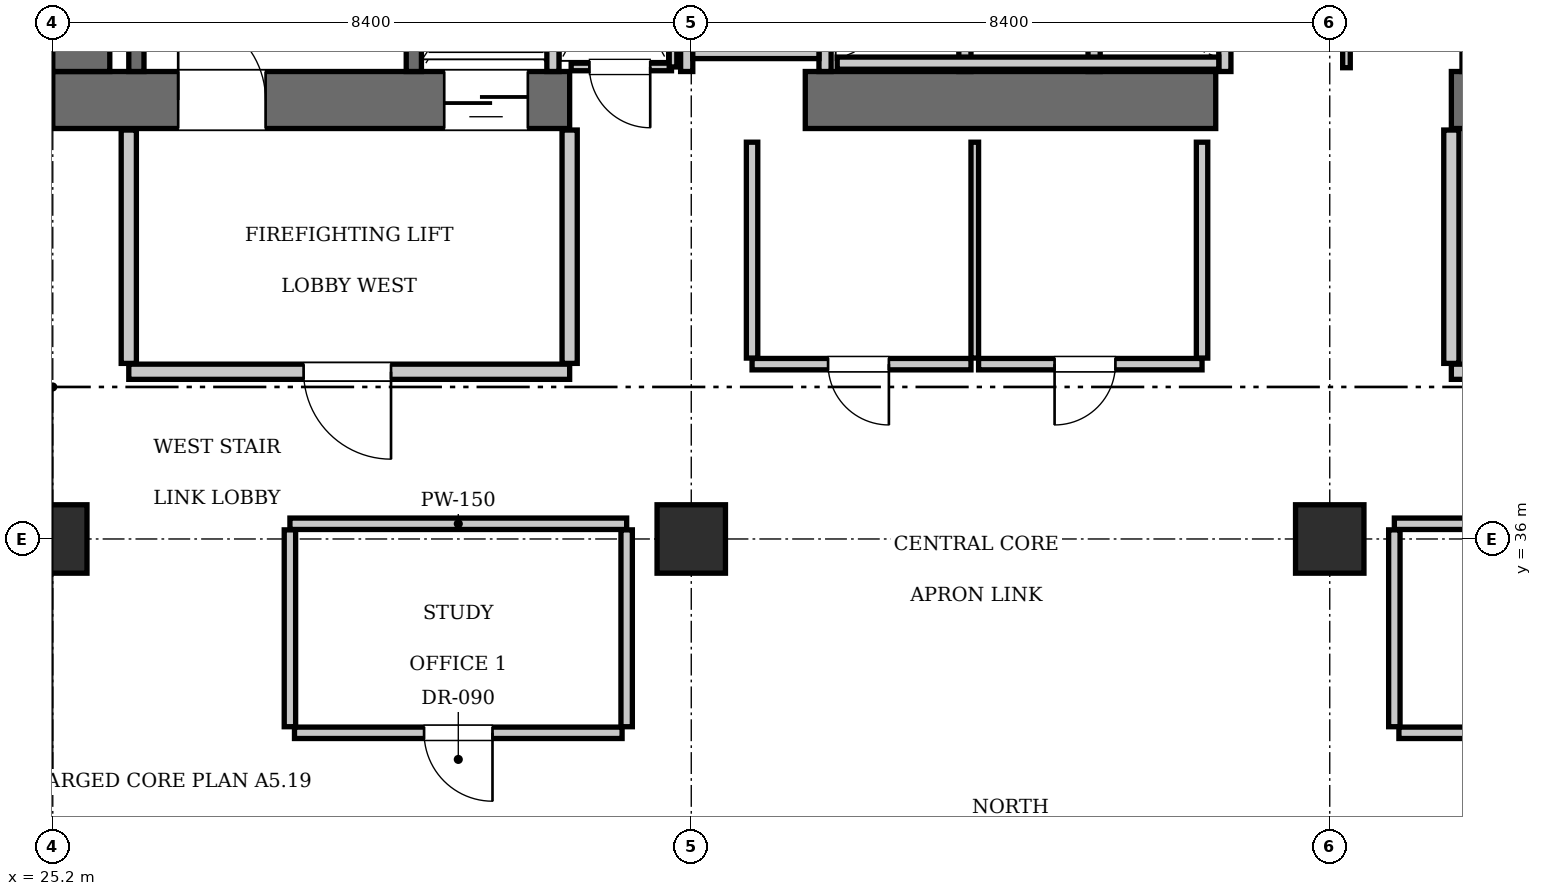
"""IFC4 building model, lengths in metres.
Left out: names, types, materials, properties, quantities, classifications, styles, units other than length and angle.
Written with IfcOpenShell. Run it as: python <this file> out.ifc"""

import sys

from ifc_helpers import new_model, si_unit, direction, frame, frame_2d, origin, origin_2d, place, context, subcontext, project, spatial, rectangle, extrude, element, fill, save


model = new_model("IFC4")
c1 = context("Model", 3, precision=1e-05, world=origin(), true_north=direction((0.0, 1.0)))
c2 = subcontext(c1, "Body", "Model", "MODEL_VIEW")
j1 = project(units=[si_unit("LENGTHUNIT", "METRE"), si_unit("PLANEANGLEUNIT", "RADIAN")], contexts=[c1])
p1 = place(None, origin())
s1 = spatial("IfcSite", under=j1, at=p1, CompositionType="ELEMENT")
p2 = place(p1, origin())
s2 = spatial("IfcBuilding", under=s1, at=p2, CompositionType="ELEMENT")
p3 = place(p2, frame((0.0, 0.0, 158.2)))
s3 = spatial("IfcBuildingStorey", under=s2, at=p3, CompositionType="ELEMENT", Elevation=158.2)
p4 = place(p3, frame((25.2, 41.775, 0.0), z_axis=(0.0, 0.0, 1.0), x_axis=(1.0, 0.0, 0.0)))
e1 = element("IfcWall", 1, at=p4, inside=s3, PredefinedType="SHEAR", context=c2, shape_type="SweptSolid", body=[
    extrude(rectangle(XDim=6.8, YDim=0.75, at=frame_2d((3.4, 0.0))), origin(), (0.0, 0.0, 1.0), 3.85),
])
p5 = place(p4, frame((1.65, 0.0, 0.0)))
e2 = element("IfcOpeningElement", 2, at=p5, cuts=e1, PredefinedType="OPENING", context=c2, shape_type="SweptSolid", body=[
    extrude(rectangle(XDim=1.15, YDim=2.15, at=frame_2d((0.575, 1.075))), frame((0.0, 0.385, 0.0), z_axis=(0.0, -1.0, 0.0), x_axis=(1.0, 0.0, 0.0)), (0.0, 0.0, 1.0), 0.77),
])
p6 = place(p4, frame((5.15, 0.0, 0.0)))
e3 = element("IfcOpeningElement", 3, at=p6, cuts=e1, PredefinedType="OPENING", context=c2, shape_type="SweptSolid", body=[
    extrude(rectangle(XDim=1.1, YDim=2.2, at=frame_2d((0.55, 1.1))), frame((0.0, 0.385, 0.0), z_axis=(0.0, -1.0, 0.0), x_axis=(1.0, 0.0, 0.0)), (0.0, 0.0, 1.0), 0.77),
])
p7 = place(p3, frame((35.1, 41.775, 0.0), z_axis=(0.0, 0.0, 1.0), x_axis=(1.0, 0.0, 0.0)))
e4 = element("IfcWall", 4, at=p7, inside=s3, PredefinedType="SHEAR", context=c2, shape_type="SweptSolid", body=[
    extrude(rectangle(XDim=5.4, YDim=0.75, at=frame_2d((2.7, 0.0))), origin(), (0.0, 0.0, 1.0), 3.85),
])
p8 = place(p3, frame((43.6, 41.775, 0.0), z_axis=(0.0, 0.0, 1.0), x_axis=(1.0, 0.0, 0.0)))
e5 = element("IfcWall", 5, at=p8, inside=s3, PredefinedType="SHEAR", context=c2, shape_type="SweptSolid", body=[
    extrude(rectangle(XDim=6.8, YDim=0.75, at=frame_2d((3.4, 0.0))), origin(), (0.0, 0.0, 1.0), 3.85),
])
p9 = place(p8, frame((3.9, 0.0, 0.0)))
e6 = element("IfcOpeningElement", 6, at=p9, cuts=e5, PredefinedType="OPENING", context=c2, shape_type="SweptSolid", body=[
    extrude(rectangle(XDim=1.15, YDim=2.15, at=frame_2d((0.575, 1.075))), frame((0.0, 0.385, 0.0), z_axis=(0.0, -1.0, 0.0), x_axis=(1.0, 0.0, 0.0)), (0.0, 0.0, 1.0), 0.77),
])
p10 = place(p8, frame((0.55, 0.0, 0.0)))
e7 = element("IfcOpeningElement", 7, at=p10, cuts=e5, PredefinedType="OPENING", context=c2, shape_type="SweptSolid", body=[
    extrude(rectangle(XDim=1.1, YDim=2.2, at=frame_2d((0.55, 1.1))), frame((0.0, 0.385, 0.0), z_axis=(0.0, -1.0, 0.0), x_axis=(1.0, 0.0, 0.0)), (0.0, 0.0, 1.0), 0.77),
])
p11 = place(p3, frame((25.575, 42.15, 0.0), z_axis=(0.0, 0.0, 1.0), x_axis=(0.0, 1.0, 0.0)))
e8 = element("IfcWall", 8, at=p11, inside=s3, PredefinedType="SHEAR", context=c2, shape_type="SweptSolid", body=[
    extrude(rectangle(XDim=1.9, YDim=0.75, at=frame_2d((0.95, 0.0))), origin(), (0.0, 0.0, 1.0), 3.85),
])
for number, where, z_axis, x_axis in (
    (9, (25.2, 36.0, 0.0), (0.0, 0.0, 1.0), (1.0, 0.0, 0.0)),
    (10, (33.6, 36.0, 0.0), (0.0, 0.0, 1.0), (1.0, 0.0, 0.0)),
    (11, (42.0, 36.0, 0.0), (0.0, 0.0, 1.0), (1.0, 0.0, 0.0)),
):
    element("IfcColumn", number, at=place(p3, frame(where, z_axis=z_axis, x_axis=x_axis)), inside=s3, PredefinedType="COLUMN", context=c2, shape_type="SweptSolid", body=[
        extrude(rectangle(XDim=0.9, YDim=0.9, at=origin_2d()), origin(), (0.0, 0.0, 1.0), 3.85),
    ])
p12 = place(p3, frame((29.95, 42.15, 0.0), z_axis=(0.0, 0.0, 1.0), x_axis=(0.0, 1.0, 0.0)))
e12 = element("IfcWall", 12, at=p12, inside=s3, PredefinedType="SOLIDWALL", context=c2, shape_type="SweptSolid", body=[
    extrude(rectangle(XDim=9.0, YDim=0.2, at=frame_2d((4.5, 0.0))), origin(), (0.0, 0.0, 1.0), 3.61),
])
p13 = place(p3, frame((26.3, 42.15, 0.0), z_axis=(0.0, 0.0, 1.0), x_axis=(0.0, 1.0, 0.0)))
e13 = element("IfcWall", 13, at=p13, inside=s3, PredefinedType="SOLIDWALL", context=c2, shape_type="SweptSolid", body=[
    extrude(rectangle(XDim=1.87, YDim=0.2, at=frame_2d((0.935, 0.0))), origin(), (0.0, 0.0, 1.0), 3.61),
])
for number, where, z_axis, x_axis in (
    (14, (31.78, 42.15, 0.0), (0.0, 0.0, 1.0), (0.0, 1.0, 0.0)),
    (15, (43.82, 42.15, 0.0), (0.0, 0.0, 1.0), (0.0, 1.0, 0.0)),
):
    element("IfcWall", number, at=place(p3, frame(where, z_axis=z_axis, x_axis=x_axis)), inside=s3, PredefinedType="SOLIDWALL", context=c2, shape_type="SweptSolid", body=[
        extrude(rectangle(XDim=2.59, YDim=0.16, at=frame_2d((1.295, 0.0))), origin(), (0.0, 0.0, 1.0), 3.61),
    ])
for number, where, z_axis, x_axis in (
    (16, (37.2, 42.15, 0.0), (0.0, 0.0, 1.0), (0.0, 1.0, 0.0)),
    (17, (38.9, 42.15, 0.0), (0.0, 0.0, 1.0), (0.0, 1.0, 0.0)),
    (18, (40.62, 42.15, 0.0), (0.0, 0.0, 1.0), (0.0, 1.0, 0.0)),
):
    element("IfcWall", number, at=place(p3, frame(where, z_axis=z_axis, x_axis=x_axis)), inside=s3, PredefinedType="SOLIDWALL", context=c2, shape_type="SweptSolid", body=[
        extrude(rectangle(XDim=2.2, YDim=0.16, at=frame_2d((1.1, 0.0))), origin(), (0.0, 0.0, 1.0), 3.61),
    ])
p14 = place(p3, frame((35.52, 42.26, 0.0), z_axis=(0.0, 0.0, 1.0), x_axis=(1.0, 0.0, 0.0)))
e19 = element("IfcWall", 19, at=p14, inside=s3, PredefinedType="SOLIDWALL", context=c2, shape_type="SweptSolid", body=[
    extrude(rectangle(XDim=5.02, YDim=0.16, at=frame_2d((2.51, 0.0))), origin(), (0.0, 0.0, 1.0), 3.61),
])
for number, where, z_axis, x_axis in (
    (20, (33.54, 42.15, 0.0), (0.0, 0.0, 1.0), (0.0, 1.0, 0.0)),
    (21, (35.36, 42.15, 0.0), (0.0, 0.0, 1.0), (0.0, 1.0, 0.0)),
):
    element("IfcWall", number, at=place(p3, frame(where, z_axis=z_axis, x_axis=x_axis)), inside=s3, PredefinedType="SOLIDWALL", context=c2, shape_type="SweptSolid", body=[
        extrude(rectangle(XDim=2.25, YDim=0.16, at=frame_2d((1.125, 0.0))), origin(), (0.0, 0.0, 1.0), 3.61),
    ])
p15 = place(p3, frame((33.62, 42.4, 0.0), z_axis=(0.0, 0.0, 1.0), x_axis=(1.0, 0.0, 0.0)))
e22 = element("IfcWall", 22, at=p15, inside=s3, PredefinedType="SOLIDWALL", context=c2, shape_type="SweptSolid", body=[
    extrude(rectangle(XDim=1.66, YDim=0.16, at=frame_2d((0.83, 0.0))), origin(), (0.0, 0.0, 1.0), 3.61),
])
p16 = place(p3, frame((26.2, 38.2, 0.0), z_axis=(0.0, 0.0, 1.0), x_axis=(1.0, 0.0, 0.0)))
e23 = element("IfcWall", 23, at=p16, inside=s3, PredefinedType="PARTITIONING", context=c2, shape_type="SweptSolid", body=[
    extrude(rectangle(XDim=5.8, YDim=0.2, at=frame_2d((2.9, 0.0))), origin(), (0.0, 0.0, 1.0), 3.61),
])
p17 = place(p16, frame((2.3, 0.0, 0.0)))
e24 = element("IfcOpeningElement", 24, at=p17, cuts=e23, PredefinedType="OPENING", context=c2, shape_type="SweptSolid", body=[
    extrude(rectangle(XDim=1.15, YDim=2.15, at=frame_2d((0.575, 1.075))), frame((0.0, 0.11, 0.0), z_axis=(0.0, -1.0, 0.0), x_axis=(1.0, 0.0, 0.0)), (0.0, 0.0, 1.0), 0.22),
])
for number, where, z_axis, x_axis in (
    (25, (26.2, 38.31, 0.0), (0.0, 0.0, 1.0), (0.0, 1.0, 0.0)),
    (26, (32.0, 38.31, 0.0), (0.0, 0.0, 1.0), (0.0, 1.0, 0.0)),
):
    element("IfcWall", number, at=place(p3, frame(where, z_axis=z_axis, x_axis=x_axis)), inside=s3, PredefinedType="PARTITIONING", context=c2, shape_type="SweptSolid", body=[
        extrude(rectangle(XDim=3.07, YDim=0.2, at=frame_2d((1.535, 0.0))), origin(), (0.0, 0.0, 1.0), 3.61),
    ])
p18 = place(p3, frame((43.6, 38.2, 0.0), z_axis=(0.0, 0.0, 1.0), x_axis=(1.0, 0.0, 0.0)))
e27 = element("IfcWall", 27, at=p18, inside=s3, PredefinedType="PARTITIONING", context=c2, shape_type="SweptSolid", body=[
    extrude(rectangle(XDim=5.8, YDim=0.2, at=frame_2d((2.9, 0.0))), origin(), (0.0, 0.0, 1.0), 3.61),
])
p19 = place(p18, frame((2.3, 0.0, 0.0)))
e28 = element("IfcOpeningElement", 28, at=p19, cuts=e27, PredefinedType="OPENING", context=c2, shape_type="SweptSolid", body=[
    extrude(rectangle(XDim=1.15, YDim=2.15, at=frame_2d((0.575, 1.075))), frame((0.0, 0.11, 0.0), z_axis=(0.0, -1.0, 0.0), x_axis=(1.0, 0.0, 0.0)), (0.0, 0.0, 1.0), 0.22),
])
p20 = place(p3, frame((43.6, 38.31, 0.0), z_axis=(0.0, 0.0, 1.0), x_axis=(0.0, 1.0, 0.0)))
e29 = element("IfcWall", 29, at=p20, inside=s3, PredefinedType="PARTITIONING", context=c2, shape_type="SweptSolid", body=[
    extrude(rectangle(XDim=3.07, YDim=0.2, at=frame_2d((1.535, 0.0))), origin(), (0.0, 0.0, 1.0), 3.61),
])
p21 = place(p3, frame((32.02, 42.21, 0.0), z_axis=(0.0, 0.0, 1.0), x_axis=(1.0, 0.0, 0.0)))
e30 = element("IfcWall", 30, at=p21, inside=s3, PredefinedType="PARTITIONING", context=c2, shape_type="SweptSolid", body=[
    extrude(rectangle(XDim=1.32, YDim=0.1, at=frame_2d((0.66, 0.0))), origin(), (0.0, 0.0, 1.0), 3.61),
])
p22 = place(p21, frame((0.24, 0.0, 0.0)))
e31 = element("IfcOpeningElement", 31, at=p22, cuts=e30, PredefinedType="OPENING", context=c2, shape_type="SweptSolid", body=[
    extrude(rectangle(XDim=0.8, YDim=2.05, at=frame_2d((0.4, 1.025))), frame((0.0, 0.06, 0.0), z_axis=(0.0, -1.0, 0.0), x_axis=(1.0, 0.0, 0.0)), (0.0, 0.0, 1.0), 0.12),
])
p23 = place(p3, frame((33.36, 42.21, 0.0), z_axis=(0.0, 0.0, 1.0), x_axis=(0.0, 1.0, 0.0)))
e32 = element("IfcWall", 32, at=p23, inside=s3, PredefinedType="PARTITIONING", context=c2, shape_type="SweptSolid", body=[
    extrude(rectangle(XDim=2.73, YDim=0.1, at=frame_2d((1.365, 0.0))), origin(), (0.0, 0.0, 1.0), 3.61),
])
p24 = place(p3, frame((42.22, 42.2, 0.0), z_axis=(0.0, 0.0, 1.0), x_axis=(0.0, 1.0, 0.0)))
e33 = element("IfcWall", 33, at=p24, inside=s3, PredefinedType="PARTITIONING", context=c2, shape_type="SweptSolid", body=[
    extrude(rectangle(XDim=2.76, YDim=0.1, at=frame_2d((1.38, 0.0))), origin(), (0.0, 0.0, 1.0), 3.61),
])
p25 = place(p24, frame((0.65, 0.0, 0.0)))
e34 = element("IfcOpeningElement", 34, at=p25, cuts=e33, PredefinedType="OPENING", context=c2, shape_type="SweptSolid", body=[
    extrude(rectangle(XDim=0.8, YDim=2.05, at=frame_2d((0.4, 1.025))), frame((0.0, 0.06, 0.0), z_axis=(0.0, -1.0, 0.0), x_axis=(1.0, 0.0, 0.0)), (0.0, 0.0, 1.0), 0.12),
])
p26 = place(p3, frame((34.4, 38.3, 0.0), z_axis=(0.0, 0.0, 1.0), x_axis=(1.0, 0.0, 0.0)))
e35 = element("IfcWall", 35, at=p26, inside=s3, PredefinedType="PARTITIONING", context=c2, shape_type="SweptSolid", body=[
    extrude(rectangle(XDim=2.88, YDim=0.15, at=frame_2d((1.44, 0.0))), origin(), (0.0, 0.0, 1.0), 3.61),
])
p27 = place(p26, frame((1.0, 0.0, 0.0)))
e36 = element("IfcOpeningElement", 36, at=p27, cuts=e35, PredefinedType="OPENING", context=c2, shape_type="SweptSolid", body=[
    extrude(rectangle(XDim=0.8, YDim=2.05, at=frame_2d((0.4, 1.025))), frame((0.0, 0.085, 0.0), z_axis=(0.0, -1.0, 0.0), x_axis=(1.0, 0.0, 0.0)), (0.0, 0.0, 1.0), 0.17),
])
p28 = place(p3, frame((37.38, 38.3, 0.0), z_axis=(0.0, 0.0, 1.0), x_axis=(1.0, 0.0, 0.0)))
e37 = element("IfcWall", 37, at=p28, inside=s3, PredefinedType="PARTITIONING", context=c2, shape_type="SweptSolid", body=[
    extrude(rectangle(XDim=2.94, YDim=0.15, at=frame_2d((1.47, 0.0))), origin(), (0.0, 0.0, 1.0), 3.61),
])
p29 = place(p28, frame((1.0, 0.0, 0.0)))
e38 = element("IfcOpeningElement", 38, at=p29, cuts=e37, PredefinedType="OPENING", context=c2, shape_type="SweptSolid", body=[
    extrude(rectangle(XDim=0.8, YDim=2.05, at=frame_2d((0.4, 1.025))), frame((0.0, 0.085, 0.0), z_axis=(0.0, -1.0, 0.0), x_axis=(1.0, 0.0, 0.0)), (0.0, 0.0, 1.0), 0.17),
])
p30 = place(p3, frame((34.4, 38.38, 0.0), z_axis=(0.0, 0.0, 1.0), x_axis=(0.0, 1.0, 0.0)))
e39 = element("IfcWall", 39, at=p30, inside=s3, PredefinedType="PARTITIONING", context=c2, shape_type="SweptSolid", body=[
    extrude(rectangle(XDim=2.84, YDim=0.15, at=frame_2d((1.42, 0.0))), origin(), (0.0, 0.0, 1.0), 3.61),
])
p31 = place(p3, frame((37.33, 38.38, 0.0), z_axis=(0.0, 0.0, 1.0), x_axis=(0.0, 1.0, 0.0)))
e40 = element("IfcWall", 40, at=p31, inside=s3, PredefinedType="PARTITIONING", context=c2, shape_type="SweptSolid", body=[
    extrude(rectangle(XDim=2.84, YDim=0.1, at=frame_2d((1.42, 0.0))), origin(), (0.0, 0.0, 1.0), 3.61),
])
p32 = place(p3, frame((40.32, 38.38, 0.0), z_axis=(0.0, 0.0, 1.0), x_axis=(0.0, 1.0, 0.0)))
e41 = element("IfcWall", 41, at=p32, inside=s3, PredefinedType="PARTITIONING", context=c2, shape_type="SweptSolid", body=[
    extrude(rectangle(XDim=2.84, YDim=0.15, at=frame_2d((1.42, 0.0))), origin(), (0.0, 0.0, 1.0), 3.61),
])
p33 = place(p3, frame((28.32, 36.2, 0.0), z_axis=(0.0, 0.0, 1.0), x_axis=(1.0, 0.0, 0.0)))
e42 = element("IfcWall", 42, at=p33, inside=s3, PredefinedType="PARTITIONING", context=c2, shape_type="SweptSolid", body=[
    extrude(rectangle(XDim=4.43, YDim=0.15, at=frame_2d((2.215, 0.0))), origin(), (0.0, 0.0, 1.0), 3.61),
])
for number, where, z_axis, x_axis in (
    (43, (28.32, 33.53, 0.0), (0.0, 0.0, 1.0), (0.0, 1.0, 0.0)),
    (44, (32.75, 33.53, 0.0), (0.0, 0.0, 1.0), (0.0, 1.0, 0.0)),
):
    element("IfcWall", number, at=place(p3, frame(where, z_axis=z_axis, x_axis=x_axis)), inside=s3, PredefinedType="PARTITIONING", context=c2, shape_type="SweptSolid", body=[
        extrude(rectangle(XDim=2.59, YDim=0.15, at=frame_2d((1.295, 0.0))), origin(), (0.0, 0.0, 1.0), 3.61),
    ])
p34 = place(p3, frame((28.38, 33.45, 0.0), z_axis=(0.0, 0.0, 1.0), x_axis=(1.0, 0.0, 0.0)))
e45 = element("IfcWall", 45, at=p34, inside=s3, PredefinedType="PARTITIONING", context=c2, shape_type="SweptSolid", body=[
    extrude(rectangle(XDim=4.31, YDim=0.15, at=frame_2d((2.155, 0.0))), origin(), (0.0, 0.0, 1.0), 3.61),
])
p35 = place(p34, frame((1.705, 0.0, 0.0)))
e46 = element("IfcOpeningElement", 46, at=p35, cuts=e45, PredefinedType="OPENING", context=c2, shape_type="SweptSolid", body=[
    extrude(rectangle(XDim=0.9, YDim=2.1, at=frame_2d((0.45, 1.05))), frame((0.0, 0.085, 0.0), z_axis=(0.0, -1.0, 0.0), x_axis=(1.0, 0.0, 0.0)), (0.0, 0.0, 1.0), 0.17),
])
p36 = place(p3, frame((42.85, 36.2, 0.0), z_axis=(0.0, 0.0, 1.0), x_axis=(1.0, 0.0, 0.0)))
e47 = element("IfcWall", 47, at=p36, inside=s3, PredefinedType="PARTITIONING", context=c2, shape_type="SweptSolid", body=[
    extrude(rectangle(XDim=4.43, YDim=0.15, at=frame_2d((2.215, 0.0))), origin(), (0.0, 0.0, 1.0), 3.61),
])
p37 = place(p3, frame((42.85, 33.53, 0.0), z_axis=(0.0, 0.0, 1.0), x_axis=(0.0, 1.0, 0.0)))
e48 = element("IfcWall", 48, at=p37, inside=s3, PredefinedType="PARTITIONING", context=c2, shape_type="SweptSolid", body=[
    extrude(rectangle(XDim=2.59, YDim=0.15, at=frame_2d((1.295, 0.0))), origin(), (0.0, 0.0, 1.0), 3.61),
])
p38 = place(p3, frame((42.91, 33.45, 0.0), z_axis=(0.0, 0.0, 1.0), x_axis=(1.0, 0.0, 0.0)))
e49 = element("IfcWall", 49, at=p38, inside=s3, PredefinedType="PARTITIONING", context=c2, shape_type="SweptSolid", body=[
    extrude(rectangle(XDim=4.31, YDim=0.15, at=frame_2d((2.155, 0.0))), origin(), (0.0, 0.0, 1.0), 3.61),
])
p39 = place(p38, frame((1.705, 0.0, 0.0)))
e50 = element("IfcOpeningElement", 50, at=p39, cuts=e49, PredefinedType="OPENING", context=c2, shape_type="SweptSolid", body=[
    extrude(rectangle(XDim=0.9, YDim=2.1, at=frame_2d((0.45, 1.05))), frame((0.0, 0.085, 0.0), z_axis=(0.0, -1.0, 0.0), x_axis=(1.0, 0.0, 0.0)), (0.0, 0.0, 1.0), 0.17),
])
p40 = place(p5, origin())
e51 = element("IfcDoor", 51, at=p40, inside=s3, OperationType="SINGLE_SWING_LEFT", PredefinedType="DOOR", context=c2, shape_type="SweptSolid", body=[
    extrude(rectangle(XDim=1.15, YDim=2.15, at=frame_2d((0.575, 1.075))), frame((0.0, 0.025, 0.0), z_axis=(0.0, -1.0, 0.0), x_axis=(1.0, 0.0, 0.0)), (0.0, 0.0, 1.0), 0.05),
])
fill(e2, e51)
p41 = place(p6, frame((1.1, 0.0, 0.0), z_axis=(0.0, 0.0, 1.0), x_axis=(-1.0, 0.0, 0.0)))
e52 = element("IfcDoor", 52, at=p41, inside=s3, OperationType="SLIDING_TO_LEFT", PredefinedType="DOOR", context=c2, shape_type="SweptSolid", body=[
    extrude(rectangle(XDim=1.1, YDim=2.2, at=frame_2d((0.55, 1.1))), frame((0.0, 0.025, 0.0), z_axis=(0.0, -1.0, 0.0), x_axis=(1.0, 0.0, 0.0)), (0.0, 0.0, 1.0), 0.05),
])
fill(e3, e52)
p42 = place(p17, frame((1.15, 0.0, 0.0), z_axis=(0.0, 0.0, 1.0), x_axis=(-1.0, 0.0, 0.0)))
e53 = element("IfcDoor", 53, at=p42, inside=s3, OperationType="SINGLE_SWING_LEFT", PredefinedType="DOOR", context=c2, shape_type="SweptSolid", body=[
    extrude(rectangle(XDim=1.15, YDim=2.15, at=frame_2d((0.575, 1.075))), frame((0.0, 0.025, 0.0), z_axis=(0.0, -1.0, 0.0), x_axis=(1.0, 0.0, 0.0)), (0.0, 0.0, 1.0), 0.05),
])
fill(e24, e53)
p43 = place(p22, frame((0.8, 0.0, 0.0), z_axis=(0.0, 0.0, 1.0), x_axis=(-1.0, 0.0, 0.0)))
e54 = element("IfcDoor", 54, at=p43, inside=s3, OperationType="SINGLE_SWING_LEFT", PredefinedType="DOOR", context=c2, shape_type="SweptSolid", body=[
    extrude(rectangle(XDim=0.8, YDim=2.05, at=frame_2d((0.4, 1.025))), frame((0.0, 0.025, 0.0), z_axis=(0.0, -1.0, 0.0), x_axis=(1.0, 0.0, 0.0)), (0.0, 0.0, 1.0), 0.05),
])
fill(e31, e54)
p44 = place(p27, frame((0.8, 0.0, 0.0), z_axis=(0.0, 0.0, 1.0), x_axis=(-1.0, 0.0, 0.0)))
e55 = element("IfcDoor", 55, at=p44, inside=s3, OperationType="SINGLE_SWING_LEFT", PredefinedType="DOOR", context=c2, shape_type="SweptSolid", body=[
    extrude(rectangle(XDim=0.8, YDim=2.05, at=frame_2d((0.4, 1.025))), frame((0.0, 0.025, 0.0), z_axis=(0.0, -1.0, 0.0), x_axis=(1.0, 0.0, 0.0)), (0.0, 0.0, 1.0), 0.05),
])
fill(e36, e55)
p45 = place(p29, frame((0.8, 0.0, 0.0), z_axis=(0.0, 0.0, 1.0), x_axis=(-1.0, 0.0, 0.0)))
e56 = element("IfcDoor", 56, at=p45, inside=s3, OperationType="SINGLE_SWING_RIGHT", PredefinedType="DOOR", context=c2, shape_type="SweptSolid", body=[
    extrude(rectangle(XDim=0.8, YDim=2.05, at=frame_2d((0.4, 1.025))), frame((0.0, 0.025, 0.0), z_axis=(0.0, -1.0, 0.0), x_axis=(1.0, 0.0, 0.0)), (0.0, 0.0, 1.0), 0.05),
])
fill(e38, e56)
p46 = place(p35, frame((0.9, 0.0, 0.0), z_axis=(0.0, 0.0, 1.0), x_axis=(-1.0, 0.0, 0.0)))
e57 = element("IfcDoor", 57, at=p46, inside=s3, OperationType="SINGLE_SWING_LEFT", PredefinedType="DOOR", context=c2, shape_type="SweptSolid", body=[
    extrude(rectangle(XDim=0.9, YDim=2.1, at=frame_2d((0.45, 1.05))), frame((0.0, 0.025, 0.0), z_axis=(0.0, -1.0, 0.0), x_axis=(1.0, 0.0, 0.0)), (0.0, 0.0, 1.0), 0.05),
])
fill(e46, e57)
save(model, sys.argv[1])
